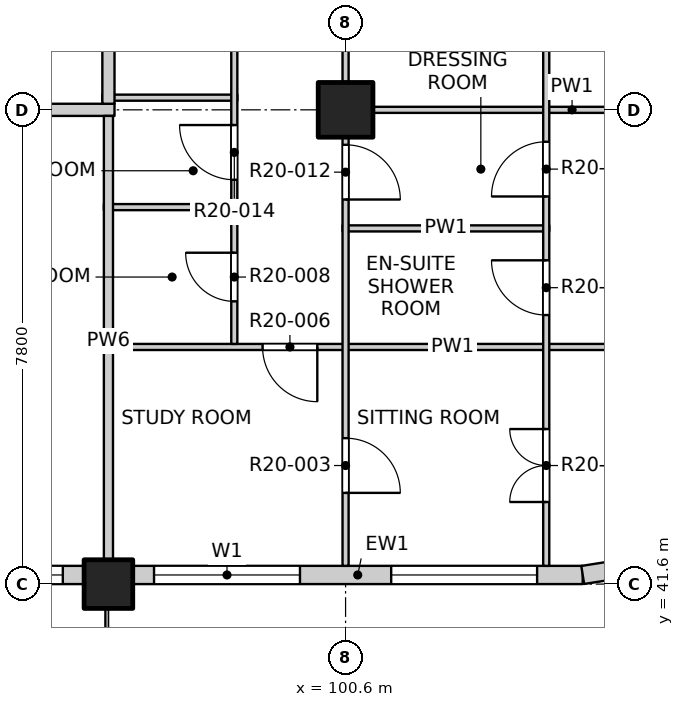
"""IFC4 building model, lengths in metres.
Left out: names, types, materials, properties, quantities, classifications, styles, units other than length and angle.
Written with IfcOpenShell. Run it as: python <this file> out.ifc"""

import sys

from ifc_helpers import new_model, si_unit, direction, frame, frame_2d, origin, origin_2d, place, context, subcontext, project, spatial, rectangle, extrude, element, fill, save


model = new_model("IFC4")
c1 = context("Model", 3, precision=1e-05, world=origin(), true_north=direction((0.0, 1.0)))
c2 = subcontext(c1, "Body", "Model", "MODEL_VIEW")
j1 = project(units=[si_unit("LENGTHUNIT", "METRE"), si_unit("PLANEANGLEUNIT", "RADIAN")], contexts=[c1])
p1 = place(None, origin())
s1 = spatial("IfcSite", under=j1, at=p1, CompositionType="ELEMENT")
p2 = place(p1, origin())
s2 = spatial("IfcBuilding", under=s1, at=p2, CompositionType="ELEMENT")
p3 = place(p2, frame((0.0, 0.0, 210.9)))
s3 = spatial("IfcBuildingStorey", under=s2, at=p3, CompositionType="ELEMENT", Elevation=210.9)
p4 = place(p3, frame((96.7, 41.6, -0.25), z_axis=(0.0, 0.0, 1.0), x_axis=(1.0, 0.0, 0.0)))
e1 = element("IfcColumn", 1, at=p4, inside=s3, PredefinedType="COLUMN", context=c2, shape_type="SweptSolid", body=[
    extrude(rectangle(XDim=0.8, YDim=0.8, at=origin_2d()), origin(), (0.0, 0.0, 1.0), 3.4),
])
p5 = place(p3, frame((100.6, 49.4, -0.25), z_axis=(0.0, 0.0, 1.0), x_axis=(1.0, 0.0, 0.0)))
e2 = element("IfcColumn", 2, at=p5, inside=s3, PredefinedType="COLUMN", context=c2, shape_type="SweptSolid", body=[
    extrude(rectangle(XDim=0.9, YDim=0.9, at=origin_2d()), origin(), (0.0, 0.0, 1.0), 3.4),
])
p6 = place(p3, frame((89.3, 41.75, 0.0), z_axis=(0.0, 0.0, 1.0), x_axis=(1.0, 0.0, 0.0)))
e3 = element("IfcWall", 3, at=p6, inside=s3, PredefinedType="SOLIDWALL", context=c2, shape_type="SweptSolid", body=[
    extrude(rectangle(XDim=7.0, YDim=0.3, at=frame_2d((3.5, 0.0))), origin(), (0.0, 0.0, 1.0), 2.7),
])
p7 = place(p6, frame((0.65, 0.0, 0.0)))
e4 = element("IfcOpeningElement", 4, at=p7, cuts=e3, PredefinedType="OPENING", context=c2, shape_type="SweptSolid", body=[
    extrude(rectangle(XDim=1.8, YDim=2.4, at=frame_2d((0.9, 1.2))), frame((0.0, 0.16, 0.0), z_axis=(0.0, -1.0, 0.0), x_axis=(1.0, 0.0, 0.0)), (0.0, 0.0, 1.0), 0.32),
])
p8 = place(p6, frame((4.25, 0.0, 0.9)))
e5 = element("IfcOpeningElement", 5, at=p8, cuts=e3, PredefinedType="OPENING", context=c2, shape_type="SweptSolid", body=[
    extrude(rectangle(XDim=2.4, YDim=1.8, at=frame_2d((1.2, 0.9))), frame((0.0, 0.16, 0.0), z_axis=(0.0, -1.0, 0.0), x_axis=(1.0, 0.0, 0.0)), (0.0, 0.0, 1.0), 0.32),
])
p9 = place(p3, frame((97.1, 41.75, 0.0), z_axis=(0.0, 0.0, 1.0), x_axis=(1.0, 0.0, 0.0)))
e6 = element("IfcWall", 6, at=p9, inside=s3, PredefinedType="SOLIDWALL", context=c2, shape_type="SweptSolid", body=[
    extrude(rectangle(XDim=7.4, YDim=0.3, at=frame_2d((3.7, 0.0))), origin(), (0.0, 0.0, 1.0), 2.7),
])
p10 = place(p9, frame((0.35, 0.0, 0.9)))
e7 = element("IfcOpeningElement", 7, at=p10, cuts=e6, PredefinedType="OPENING", context=c2, shape_type="SweptSolid", body=[
    extrude(rectangle(XDim=2.4, YDim=1.8, at=frame_2d((1.2, 0.9))), frame((0.0, 0.16, 0.0), z_axis=(0.0, -1.0, 0.0), x_axis=(1.0, 0.0, 0.0)), (0.0, 0.0, 1.0), 0.32),
])
p11 = place(p9, frame((4.25, 0.0, 0.9)))
e8 = element("IfcOpeningElement", 8, at=p11, cuts=e6, PredefinedType="OPENING", context=c2, shape_type="SweptSolid", body=[
    extrude(rectangle(XDim=2.4, YDim=1.8, at=frame_2d((1.2, 0.9))), frame((0.0, 0.16, 0.0), z_axis=(0.0, -1.0, 0.0), x_axis=(1.0, 0.0, 0.0)), (0.0, 0.0, 1.0), 0.32),
])
p12 = place(p3, frame((104.5, 41.75, 0.0), z_axis=(0.0, 0.0, 1.0), x_axis=(0.987678452879, 0.156496880861, 0.0)))
e9 = element("IfcWall", 9, at=p12, inside=s3, PredefinedType="SOLIDWALL", context=c2, shape_type="SweptSolid", body=[
    extrude(rectangle(XDim=1.173, YDim=0.3, at=frame_2d((0.586, 0.0))), origin(), (0.0, 0.0, 1.0), 2.7),
])
p13 = place(p3, frame((96.625, 45.5, 0.0), z_axis=(0.0, 0.0, 1.0), x_axis=(1.0, 0.0, 0.0)))
e10 = element("IfcWall", 10, at=p13, inside=s3, PredefinedType="PARTITIONING", context=c2, shape_type="SweptSolid", body=[
    extrude(rectangle(XDim=11.475, YDim=0.1, at=frame_2d((5.738, 0.0))), origin(), (0.0, 0.0, 1.0), 3.15),
])
p14 = place(p13, frame((2.61, 0.0, 0.0)))
e11 = element("IfcOpeningElement", 11, at=p14, cuts=e10, PredefinedType="OPENING", context=c2, shape_type="SweptSolid", body=[
    extrude(rectangle(XDim=0.9, YDim=2.1, at=frame_2d((0.45, 1.05))), frame((0.0, 0.06, 0.0), z_axis=(0.0, -1.0, 0.0), x_axis=(1.0, 0.0, 0.0)), (0.0, 0.0, 1.0), 0.12),
])
p15 = place(p3, frame((100.55, 47.45, 0.0), z_axis=(0.0, 0.0, 1.0), x_axis=(1.0, 0.0, 0.0)))
e12 = element("IfcWall", 12, at=p15, inside=s3, PredefinedType="PARTITIONING", context=c2, shape_type="SweptSolid", body=[
    extrude(rectangle(XDim=3.4, YDim=0.1, at=frame_2d((1.7, 0.0))), origin(), (0.0, 0.0, 1.0), 3.15),
])
p16 = place(p3, frame((96.625, 47.8, 0.0), z_axis=(0.0, 0.0, 1.0), x_axis=(1.0, 0.0, 0.0)))
e13 = element("IfcWall", 13, at=p16, inside=s3, PredefinedType="PARTITIONING", context=c2, shape_type="SweptSolid", body=[
    extrude(rectangle(XDim=2.195, YDim=0.1, at=frame_2d((1.098, 0.0))), origin(), (0.0, 0.0, 1.0), 3.15),
])
p17 = place(p3, frame((73.2, 49.4, 0.0), z_axis=(0.0, 0.0, 1.0), x_axis=(1.0, 0.0, 0.0)))
e14 = element("IfcWall", 14, at=p17, inside=s3, PredefinedType="PARTITIONING", context=c2, shape_type="SweptSolid", body=[
    extrude(rectangle(XDim=23.6, YDim=0.2, at=frame_2d((11.8, 0.0))), origin(), (0.0, 0.0, 1.0), 3.15),
])
p18 = place(p17, frame((1.6, 0.0, 0.0)))
e15 = element("IfcOpeningElement", 15, at=p18, cuts=e14, PredefinedType="OPENING", context=c2, shape_type="SweptSolid", body=[
    extrude(rectangle(XDim=0.9, YDim=2.1, at=frame_2d((0.45, 1.05))), frame((0.0, 0.11, 0.0), z_axis=(0.0, -1.0, 0.0), x_axis=(1.0, 0.0, 0.0)), (0.0, 0.0, 1.0), 0.22),
])
p19 = place(p17, frame((5.5, 0.0, 0.0)))
e16 = element("IfcOpeningElement", 16, at=p19, cuts=e14, PredefinedType="OPENING", context=c2, shape_type="SweptSolid", body=[
    extrude(rectangle(XDim=0.9, YDim=2.1, at=frame_2d((0.45, 1.05))), frame((0.0, 0.11, 0.0), z_axis=(0.0, -1.0, 0.0), x_axis=(1.0, 0.0, 0.0)), (0.0, 0.0, 1.0), 0.22),
])
p20 = place(p17, frame((12.375, 0.0, 0.0)))
e17 = element("IfcOpeningElement", 17, at=p20, cuts=e14, PredefinedType="OPENING", context=c2, shape_type="SweptSolid", body=[
    extrude(rectangle(XDim=1.2, YDim=2.1, at=frame_2d((0.6, 1.05))), frame((0.0, 0.11, 0.0), z_axis=(0.0, -1.0, 0.0), x_axis=(1.0, 0.0, 0.0)), (0.0, 0.0, 1.0), 0.22),
])
p21 = place(p17, frame((20.15, 0.0, 0.0)))
e18 = element("IfcOpeningElement", 18, at=p21, cuts=e14, PredefinedType="OPENING", context=c2, shape_type="SweptSolid", body=[
    extrude(rectangle(XDim=1.2, YDim=2.1, at=frame_2d((0.6, 1.05))), frame((0.0, 0.11, 0.0), z_axis=(0.0, -1.0, 0.0), x_axis=(1.0, 0.0, 0.0)), (0.0, 0.0, 1.0), 0.22),
])
p22 = place(p3, frame((100.55, 49.4, 0.0), z_axis=(0.0, 0.0, 1.0), x_axis=(1.0, 0.0, 0.0)))
e19 = element("IfcWall", 19, at=p22, inside=s3, PredefinedType="PARTITIONING", context=c2, shape_type="SweptSolid", body=[
    extrude(rectangle(XDim=7.55, YDim=0.1, at=frame_2d((3.775, 0.0))), origin(), (0.0, 0.0, 1.0), 3.15),
])
p23 = place(p3, frame((96.6, 49.6, 0.0), z_axis=(0.0, 0.0, 1.0), x_axis=(1.0, 0.0, 0.0)))
e20 = element("IfcWall", 20, at=p23, inside=s3, PredefinedType="PARTITIONING", context=c2, shape_type="SweptSolid", body=[
    extrude(rectangle(XDim=2.22, YDim=0.1, at=frame_2d((1.11, 0.0))), origin(), (0.0, 0.0, 1.0), 3.15),
])
p24 = place(p3, frame((96.7, 41.9, 0.0), z_axis=(0.0, 0.0, 1.0), x_axis=(0.0, 1.0, 0.0)))
e21 = element("IfcWall", 21, at=p24, inside=s3, PredefinedType="PARTITIONING", context=c2, shape_type="SweptSolid", body=[
    extrude(rectangle(XDim=7.4, YDim=0.15, at=frame_2d((3.7, 0.0))), origin(), (0.0, 0.0, 1.0), 3.15),
])
p25 = place(p3, frame((96.7, 49.5, 0.0), z_axis=(0.0, 0.0, 1.0), x_axis=(0.0, 1.0, 0.0)))
e22 = element("IfcWall", 22, at=p25, inside=s3, PredefinedType="PARTITIONING", context=c2, shape_type="SweptSolid", body=[
    extrude(rectangle(XDim=34.9, YDim=0.2, at=frame_2d((17.45, 0.0))), origin(), (0.0, 0.0, 1.0), 3.15),
])
p26 = place(p25, frame((9.625, 0.0, 0.0)))
e23 = element("IfcOpeningElement", 23, at=p26, cuts=e22, PredefinedType="OPENING", context=c2, shape_type="SweptSolid", body=[
    extrude(rectangle(XDim=1.0, YDim=2.1, at=frame_2d((0.5, 1.05))), frame((0.0, 0.11, 0.0), z_axis=(0.0, -1.0, 0.0), x_axis=(1.0, 0.0, 0.0)), (0.0, 0.0, 1.0), 0.22),
])
p27 = place(p25, frame((14.125, 0.0, 0.0)))
e24 = element("IfcOpeningElement", 24, at=p27, cuts=e22, PredefinedType="OPENING", context=c2, shape_type="SweptSolid", body=[
    extrude(rectangle(XDim=1.0, YDim=2.1, at=frame_2d((0.5, 1.05))), frame((0.0, 0.11, 0.0), z_axis=(0.0, -1.0, 0.0), x_axis=(1.0, 0.0, 0.0)), (0.0, 0.0, 1.0), 0.22),
])
p28 = place(p25, frame((29.275, 0.0, 0.0)))
e25 = element("IfcOpeningElement", 25, at=p28, cuts=e22, PredefinedType="OPENING", context=c2, shape_type="SweptSolid", body=[
    extrude(rectangle(XDim=1.0, YDim=2.1, at=frame_2d((0.5, 1.05))), frame((0.0, 0.11, 0.0), z_axis=(0.0, -1.0, 0.0), x_axis=(1.0, 0.0, 0.0)), (0.0, 0.0, 1.0), 0.22),
])
p29 = place(p3, frame((98.77, 45.55, 0.0), z_axis=(0.0, 0.0, 1.0), x_axis=(0.0, 1.0, 0.0)))
e26 = element("IfcWall", 26, at=p29, inside=s3, PredefinedType="PARTITIONING", context=c2, shape_type="SweptSolid", body=[
    extrude(rectangle(XDim=12.25, YDim=0.1, at=frame_2d((6.125, 0.0))), origin(), (0.0, 0.0, 1.0), 3.15),
])
p30 = place(p29, frame((0.7, 0.0, 0.0)))
e27 = element("IfcOpeningElement", 27, at=p30, cuts=e26, PredefinedType="OPENING", context=c2, shape_type="SweptSolid", body=[
    extrude(rectangle(XDim=0.8, YDim=2.1, at=frame_2d((0.4, 1.05))), frame((0.0, 0.06, 0.0), z_axis=(0.0, -1.0, 0.0), x_axis=(1.0, 0.0, 0.0)), (0.0, 0.0, 1.0), 0.12),
])
p31 = place(p29, frame((2.7, 0.0, 0.0)))
e28 = element("IfcOpeningElement", 28, at=p31, cuts=e26, PredefinedType="OPENING", context=c2, shape_type="SweptSolid", body=[
    extrude(rectangle(XDim=0.9, YDim=2.1, at=frame_2d((0.45, 1.05))), frame((0.0, 0.06, 0.0), z_axis=(0.0, -1.0, 0.0), x_axis=(1.0, 0.0, 0.0)), (0.0, 0.0, 1.0), 0.12),
])
p32 = place(p29, frame((4.95, 0.0, 0.0)))
e29 = element("IfcOpeningElement", 29, at=p32, cuts=e26, PredefinedType="OPENING", context=c2, shape_type="SweptSolid", body=[
    extrude(rectangle(XDim=0.8, YDim=2.1, at=frame_2d((0.4, 1.05))), frame((0.0, 0.06, 0.0), z_axis=(0.0, -1.0, 0.0), x_axis=(1.0, 0.0, 0.0)), (0.0, 0.0, 1.0), 0.12),
])
p33 = place(p29, frame((7.415, 0.0, 0.0)))
e30 = element("IfcOpeningElement", 30, at=p33, cuts=e26, PredefinedType="OPENING", context=c2, shape_type="SweptSolid", body=[
    extrude(rectangle(XDim=0.9, YDim=2.1, at=frame_2d((0.45, 1.05))), frame((0.0, 0.06, 0.0), z_axis=(0.0, -1.0, 0.0), x_axis=(1.0, 0.0, 0.0)), (0.0, 0.0, 1.0), 0.12),
])
p34 = place(p29, frame((10.24, 0.0, 0.0)))
e31 = element("IfcOpeningElement", 31, at=p34, cuts=e26, PredefinedType="OPENING", context=c2, shape_type="SweptSolid", body=[
    extrude(rectangle(XDim=0.9, YDim=2.1, at=frame_2d((0.45, 1.05))), frame((0.0, 0.06, 0.0), z_axis=(0.0, -1.0, 0.0), x_axis=(1.0, 0.0, 0.0)), (0.0, 0.0, 1.0), 0.12),
])
p35 = place(p3, frame((100.6, 41.9, 0.0), z_axis=(0.0, 0.0, 1.0), x_axis=(0.0, 1.0, 0.0)))
e32 = element("IfcWall", 32, at=p35, inside=s3, PredefinedType="PARTITIONING", context=c2, shape_type="SweptSolid", body=[
    extrude(rectangle(XDim=46.2, YDim=0.1, at=frame_2d((23.1, 0.0))), origin(), (0.0, 0.0, 1.0), 3.15),
])
p36 = place(p35, frame((1.2, 0.0, 0.0)))
e33 = element("IfcOpeningElement", 33, at=p36, cuts=e32, PredefinedType="OPENING", context=c2, shape_type="SweptSolid", body=[
    extrude(rectangle(XDim=0.9, YDim=2.1, at=frame_2d((0.45, 1.05))), frame((0.0, 0.06, 0.0), z_axis=(0.0, -1.0, 0.0), x_axis=(1.0, 0.0, 0.0)), (0.0, 0.0, 1.0), 0.12),
])
p37 = place(p35, frame((6.025, 0.0, 0.0)))
e34 = element("IfcOpeningElement", 34, at=p37, cuts=e32, PredefinedType="OPENING", context=c2, shape_type="SweptSolid", body=[
    extrude(rectangle(XDim=0.9, YDim=2.1, at=frame_2d((0.45, 1.05))), frame((0.0, 0.06, 0.0), z_axis=(0.0, -1.0, 0.0), x_axis=(1.0, 0.0, 0.0)), (0.0, 0.0, 1.0), 0.12),
])
p38 = place(p35, frame((9.0, 0.0, 0.0)))
e35 = element("IfcOpeningElement", 35, at=p38, cuts=e32, PredefinedType="OPENING", context=c2, shape_type="SweptSolid", body=[
    extrude(rectangle(XDim=0.9, YDim=2.1, at=frame_2d((0.45, 1.05))), frame((0.0, 0.06, 0.0), z_axis=(0.0, -1.0, 0.0), x_axis=(1.0, 0.0, 0.0)), (0.0, 0.0, 1.0), 0.12),
])
p39 = place(p35, frame((13.85, 0.0, 0.0)))
e36 = element("IfcOpeningElement", 36, at=p39, cuts=e32, PredefinedType="OPENING", context=c2, shape_type="SweptSolid", body=[
    extrude(rectangle(XDim=0.9, YDim=2.1, at=frame_2d((0.45, 1.05))), frame((0.0, 0.06, 0.0), z_axis=(0.0, -1.0, 0.0), x_axis=(1.0, 0.0, 0.0)), (0.0, 0.0, 1.0), 0.12),
])
p40 = place(p35, frame((17.775, 0.0, 0.0)))
e37 = element("IfcOpeningElement", 37, at=p40, cuts=e32, PredefinedType="OPENING", context=c2, shape_type="SweptSolid", body=[
    extrude(rectangle(XDim=0.9, YDim=2.1, at=frame_2d((0.45, 1.05))), frame((0.0, 0.06, 0.0), z_axis=(0.0, -1.0, 0.0), x_axis=(1.0, 0.0, 0.0)), (0.0, 0.0, 1.0), 0.12),
])
p41 = place(p35, frame((20.7, 0.0, 0.0)))
e38 = element("IfcOpeningElement", 38, at=p41, cuts=e32, PredefinedType="OPENING", context=c2, shape_type="SweptSolid", body=[
    extrude(rectangle(XDim=0.9, YDim=2.1, at=frame_2d((0.45, 1.05))), frame((0.0, 0.06, 0.0), z_axis=(0.0, -1.0, 0.0), x_axis=(1.0, 0.0, 0.0)), (0.0, 0.0, 1.0), 0.12),
])
p42 = place(p35, frame((24.6, 0.0, 0.0)))
e39 = element("IfcOpeningElement", 39, at=p42, cuts=e32, PredefinedType="OPENING", context=c2, shape_type="SweptSolid", body=[
    extrude(rectangle(XDim=0.9, YDim=2.1, at=frame_2d((0.45, 1.05))), frame((0.0, 0.06, 0.0), z_axis=(0.0, -1.0, 0.0), x_axis=(1.0, 0.0, 0.0)), (0.0, 0.0, 1.0), 0.12),
])
p43 = place(p35, frame((29.425, 0.0, 0.0)))
e40 = element("IfcOpeningElement", 40, at=p43, cuts=e32, PredefinedType="OPENING", context=c2, shape_type="SweptSolid", body=[
    extrude(rectangle(XDim=0.9, YDim=2.1, at=frame_2d((0.45, 1.05))), frame((0.0, 0.06, 0.0), z_axis=(0.0, -1.0, 0.0), x_axis=(1.0, 0.0, 0.0)), (0.0, 0.0, 1.0), 0.12),
])
p44 = place(p35, frame((33.375, 0.0, 0.0)))
e41 = element("IfcOpeningElement", 41, at=p44, cuts=e32, PredefinedType="OPENING", context=c2, shape_type="SweptSolid", body=[
    extrude(rectangle(XDim=0.9, YDim=2.1, at=frame_2d((0.45, 1.05))), frame((0.0, 0.06, 0.0), z_axis=(0.0, -1.0, 0.0), x_axis=(1.0, 0.0, 0.0)), (0.0, 0.0, 1.0), 0.12),
])
p45 = place(p35, frame((36.3, 0.0, 0.0)))
e42 = element("IfcOpeningElement", 42, at=p45, cuts=e32, PredefinedType="OPENING", context=c2, shape_type="SweptSolid", body=[
    extrude(rectangle(XDim=0.9, YDim=2.1, at=frame_2d((0.45, 1.05))), frame((0.0, 0.06, 0.0), z_axis=(0.0, -1.0, 0.0), x_axis=(1.0, 0.0, 0.0)), (0.0, 0.0, 1.0), 0.12),
])
p46 = place(p35, frame((41.175, 0.0, 0.0)))
e43 = element("IfcOpeningElement", 43, at=p46, cuts=e32, PredefinedType="OPENING", context=c2, shape_type="SweptSolid", body=[
    extrude(rectangle(XDim=0.9, YDim=2.1, at=frame_2d((0.45, 1.05))), frame((0.0, 0.06, 0.0), z_axis=(0.0, -1.0, 0.0), x_axis=(1.0, 0.0, 0.0)), (0.0, 0.0, 1.0), 0.12),
])
p47 = place(p35, frame((44.1, 0.0, 0.0)))
e44 = element("IfcOpeningElement", 44, at=p47, cuts=e32, PredefinedType="OPENING", context=c2, shape_type="SweptSolid", body=[
    extrude(rectangle(XDim=0.9, YDim=2.1, at=frame_2d((0.45, 1.05))), frame((0.0, 0.06, 0.0), z_axis=(0.0, -1.0, 0.0), x_axis=(1.0, 0.0, 0.0)), (0.0, 0.0, 1.0), 0.12),
])
p48 = place(p3, frame((103.9, 41.9, 0.0), z_axis=(0.0, 0.0, 1.0), x_axis=(0.0, 1.0, 0.0)))
e45 = element("IfcWall", 45, at=p48, inside=s3, PredefinedType="PARTITIONING", context=c2, shape_type="SweptSolid", body=[
    extrude(rectangle(XDim=19.1, YDim=0.1, at=frame_2d((9.55, 0.0))), origin(), (0.0, 0.0, 1.0), 3.15),
])
p49 = place(p48, frame((1.05, 0.0, 0.0)))
e46 = element("IfcOpeningElement", 46, at=p49, cuts=e45, PredefinedType="OPENING", context=c2, shape_type="SweptSolid", body=[
    extrude(rectangle(XDim=1.2, YDim=2.1, at=frame_2d((0.6, 1.05))), frame((0.0, 0.06, 0.0), z_axis=(0.0, -1.0, 0.0), x_axis=(1.0, 0.0, 0.0)), (0.0, 0.0, 1.0), 0.12),
])
p50 = place(p48, frame((4.125, 0.0, 0.0)))
e47 = element("IfcOpeningElement", 47, at=p50, cuts=e45, PredefinedType="OPENING", context=c2, shape_type="SweptSolid", body=[
    extrude(rectangle(XDim=0.9, YDim=2.1, at=frame_2d((0.45, 1.05))), frame((0.0, 0.06, 0.0), z_axis=(0.0, -1.0, 0.0), x_axis=(1.0, 0.0, 0.0)), (0.0, 0.0, 1.0), 0.12),
])
p51 = place(p48, frame((6.075, 0.0, 0.0)))
e48 = element("IfcOpeningElement", 48, at=p51, cuts=e45, PredefinedType="OPENING", context=c2, shape_type="SweptSolid", body=[
    extrude(rectangle(XDim=0.9, YDim=2.1, at=frame_2d((0.45, 1.05))), frame((0.0, 0.06, 0.0), z_axis=(0.0, -1.0, 0.0), x_axis=(1.0, 0.0, 0.0)), (0.0, 0.0, 1.0), 0.12),
])
p52 = place(p48, frame((8.85, 0.0, 0.0)))
e49 = element("IfcOpeningElement", 49, at=p52, cuts=e45, PredefinedType="OPENING", context=c2, shape_type="SweptSolid", body=[
    extrude(rectangle(XDim=1.2, YDim=2.1, at=frame_2d((0.6, 1.05))), frame((0.0, 0.06, 0.0), z_axis=(0.0, -1.0, 0.0), x_axis=(1.0, 0.0, 0.0)), (0.0, 0.0, 1.0), 0.12),
])
p53 = place(p48, frame((11.925, 0.0, 0.0)))
e50 = element("IfcOpeningElement", 50, at=p53, cuts=e45, PredefinedType="OPENING", context=c2, shape_type="SweptSolid", body=[
    extrude(rectangle(XDim=0.9, YDim=2.1, at=frame_2d((0.45, 1.05))), frame((0.0, 0.06, 0.0), z_axis=(0.0, -1.0, 0.0), x_axis=(1.0, 0.0, 0.0)), (0.0, 0.0, 1.0), 0.12),
])
p54 = place(p48, frame((13.875, 0.0, 0.0)))
e51 = element("IfcOpeningElement", 51, at=p54, cuts=e45, PredefinedType="OPENING", context=c2, shape_type="SweptSolid", body=[
    extrude(rectangle(XDim=0.9, YDim=2.1, at=frame_2d((0.45, 1.05))), frame((0.0, 0.06, 0.0), z_axis=(0.0, -1.0, 0.0), x_axis=(1.0, 0.0, 0.0)), (0.0, 0.0, 1.0), 0.12),
])
p55 = place(p48, frame((15.825, 0.0, 0.0)))
e52 = element("IfcOpeningElement", 52, at=p55, cuts=e45, PredefinedType="OPENING", context=c2, shape_type="SweptSolid", body=[
    extrude(rectangle(XDim=0.9, YDim=2.1, at=frame_2d((0.45, 1.05))), frame((0.0, 0.06, 0.0), z_axis=(0.0, -1.0, 0.0), x_axis=(1.0, 0.0, 0.0)), (0.0, 0.0, 1.0), 0.12),
])
p56 = place(p48, frame((17.775, 0.0, 0.0)))
e53 = element("IfcOpeningElement", 53, at=p56, cuts=e45, PredefinedType="OPENING", context=c2, shape_type="SweptSolid", body=[
    extrude(rectangle(XDim=0.9, YDim=2.1, at=frame_2d((0.45, 1.05))), frame((0.0, 0.06, 0.0), z_axis=(0.0, -1.0, 0.0), x_axis=(1.0, 0.0, 0.0)), (0.0, 0.0, 1.0), 0.12),
])
p57 = place(p8, origin())
e54 = element("IfcWindow", 54, at=p57, inside=s3, PartitioningType="DOUBLE_PANEL_VERTICAL", PredefinedType="WINDOW", context=c2, shape_type="SweptSolid", body=[
    extrude(rectangle(XDim=2.4, YDim=1.8, at=frame_2d((1.2, 0.9))), frame((0.0, 0.03, 0.0), z_axis=(0.0, -1.0, 0.0), x_axis=(1.0, 0.0, 0.0)), (0.0, 0.0, 1.0), 0.06),
])
fill(e5, e54)
p58 = place(p10, origin())
e55 = element("IfcWindow", 55, at=p58, inside=s3, PartitioningType="DOUBLE_PANEL_VERTICAL", PredefinedType="WINDOW", context=c2, shape_type="SweptSolid", body=[
    extrude(rectangle(XDim=2.4, YDim=1.8, at=frame_2d((1.2, 0.9))), frame((0.0, 0.03, 0.0), z_axis=(0.0, -1.0, 0.0), x_axis=(1.0, 0.0, 0.0)), (0.0, 0.0, 1.0), 0.06),
])
fill(e7, e55)
p59 = place(p11, origin())
e56 = element("IfcWindow", 56, at=p59, inside=s3, PartitioningType="DOUBLE_PANEL_VERTICAL", PredefinedType="WINDOW", context=c2, shape_type="SweptSolid", body=[
    extrude(rectangle(XDim=2.4, YDim=1.8, at=frame_2d((1.2, 0.9))), frame((0.0, 0.03, 0.0), z_axis=(0.0, -1.0, 0.0), x_axis=(1.0, 0.0, 0.0)), (0.0, 0.0, 1.0), 0.06),
])
fill(e8, e56)
p60 = place(p36, origin())
e57 = element("IfcDoor", 57, at=p60, inside=s3, OperationType="SINGLE_SWING_RIGHT", PredefinedType="DOOR", context=c2, shape_type="SweptSolid", body=[
    extrude(rectangle(XDim=0.9, YDim=2.1, at=frame_2d((0.45, 1.05))), frame((0.0, 0.025, 0.0), z_axis=(0.0, -1.0, 0.0), x_axis=(1.0, 0.0, 0.0)), (0.0, 0.0, 1.0), 0.05),
])
fill(e33, e57)
p61 = place(p49, origin())
e58 = element("IfcDoor", 58, at=p61, inside=s3, OperationType="DOUBLE_DOOR_SINGLE_SWING", PredefinedType="DOOR", context=c2, shape_type="SweptSolid", body=[
    extrude(rectangle(XDim=1.2, YDim=2.1, at=frame_2d((0.6, 1.05))), frame((0.0, 0.025, 0.0), z_axis=(0.0, -1.0, 0.0), x_axis=(1.0, 0.0, 0.0)), (0.0, 0.0, 1.0), 0.05),
])
fill(e46, e58)
p62 = place(p14, origin())
e59 = element("IfcDoor", 59, at=p62, inside=s3, OperationType="SINGLE_SWING_LEFT", PredefinedType="DOOR", context=c2, shape_type="SweptSolid", body=[
    extrude(rectangle(XDim=0.9, YDim=2.1, at=frame_2d((0.45, 1.05))), frame((0.0, 0.025, 0.0), z_axis=(0.0, -1.0, 0.0), x_axis=(1.0, 0.0, 0.0)), (0.0, 0.0, 1.0), 0.05),
])
fill(e11, e59)
p63 = place(p50, origin())
e60 = element("IfcDoor", 60, at=p63, inside=s3, OperationType="SINGLE_SWING_RIGHT", PredefinedType="DOOR", context=c2, shape_type="SweptSolid", body=[
    extrude(rectangle(XDim=0.9, YDim=2.1, at=frame_2d((0.45, 1.05))), frame((0.0, 0.025, 0.0), z_axis=(0.0, -1.0, 0.0), x_axis=(1.0, 0.0, 0.0)), (0.0, 0.0, 1.0), 0.05),
])
fill(e47, e60)
p64 = place(p30, origin())
e61 = element("IfcDoor", 61, at=p64, inside=s3, OperationType="SINGLE_SWING_RIGHT", PredefinedType="DOOR", context=c2, shape_type="SweptSolid", body=[
    extrude(rectangle(XDim=0.8, YDim=2.1, at=frame_2d((0.4, 1.05))), frame((0.0, 0.025, 0.0), z_axis=(0.0, -1.0, 0.0), x_axis=(1.0, 0.0, 0.0)), (0.0, 0.0, 1.0), 0.05),
])
fill(e27, e61)
p65 = place(p37, origin())
e62 = element("IfcDoor", 62, at=p65, inside=s3, OperationType="SINGLE_SWING_RIGHT", PredefinedType="DOOR", context=c2, shape_type="SweptSolid", body=[
    extrude(rectangle(XDim=0.9, YDim=2.1, at=frame_2d((0.45, 1.05))), frame((0.0, 0.025, 0.0), z_axis=(0.0, -1.0, 0.0), x_axis=(1.0, 0.0, 0.0)), (0.0, 0.0, 1.0), 0.05),
])
fill(e34, e62)
p66 = place(p51, origin())
e63 = element("IfcDoor", 63, at=p66, inside=s3, OperationType="SINGLE_SWING_LEFT", PredefinedType="DOOR", context=c2, shape_type="SweptSolid", body=[
    extrude(rectangle(XDim=0.9, YDim=2.1, at=frame_2d((0.45, 1.05))), frame((0.0, 0.025, 0.0), z_axis=(0.0, -1.0, 0.0), x_axis=(1.0, 0.0, 0.0)), (0.0, 0.0, 1.0), 0.05),
])
fill(e48, e63)
p67 = place(p31, origin())
e64 = element("IfcDoor", 64, at=p67, inside=s3, OperationType="SINGLE_SWING_RIGHT", PredefinedType="DOOR", context=c2, shape_type="SweptSolid", body=[
    extrude(rectangle(XDim=0.9, YDim=2.1, at=frame_2d((0.45, 1.05))), frame((0.0, 0.025, 0.0), z_axis=(0.0, -1.0, 0.0), x_axis=(1.0, 0.0, 0.0)), (0.0, 0.0, 1.0), 0.05),
])
fill(e28, e64)
save(model, sys.argv[1])
